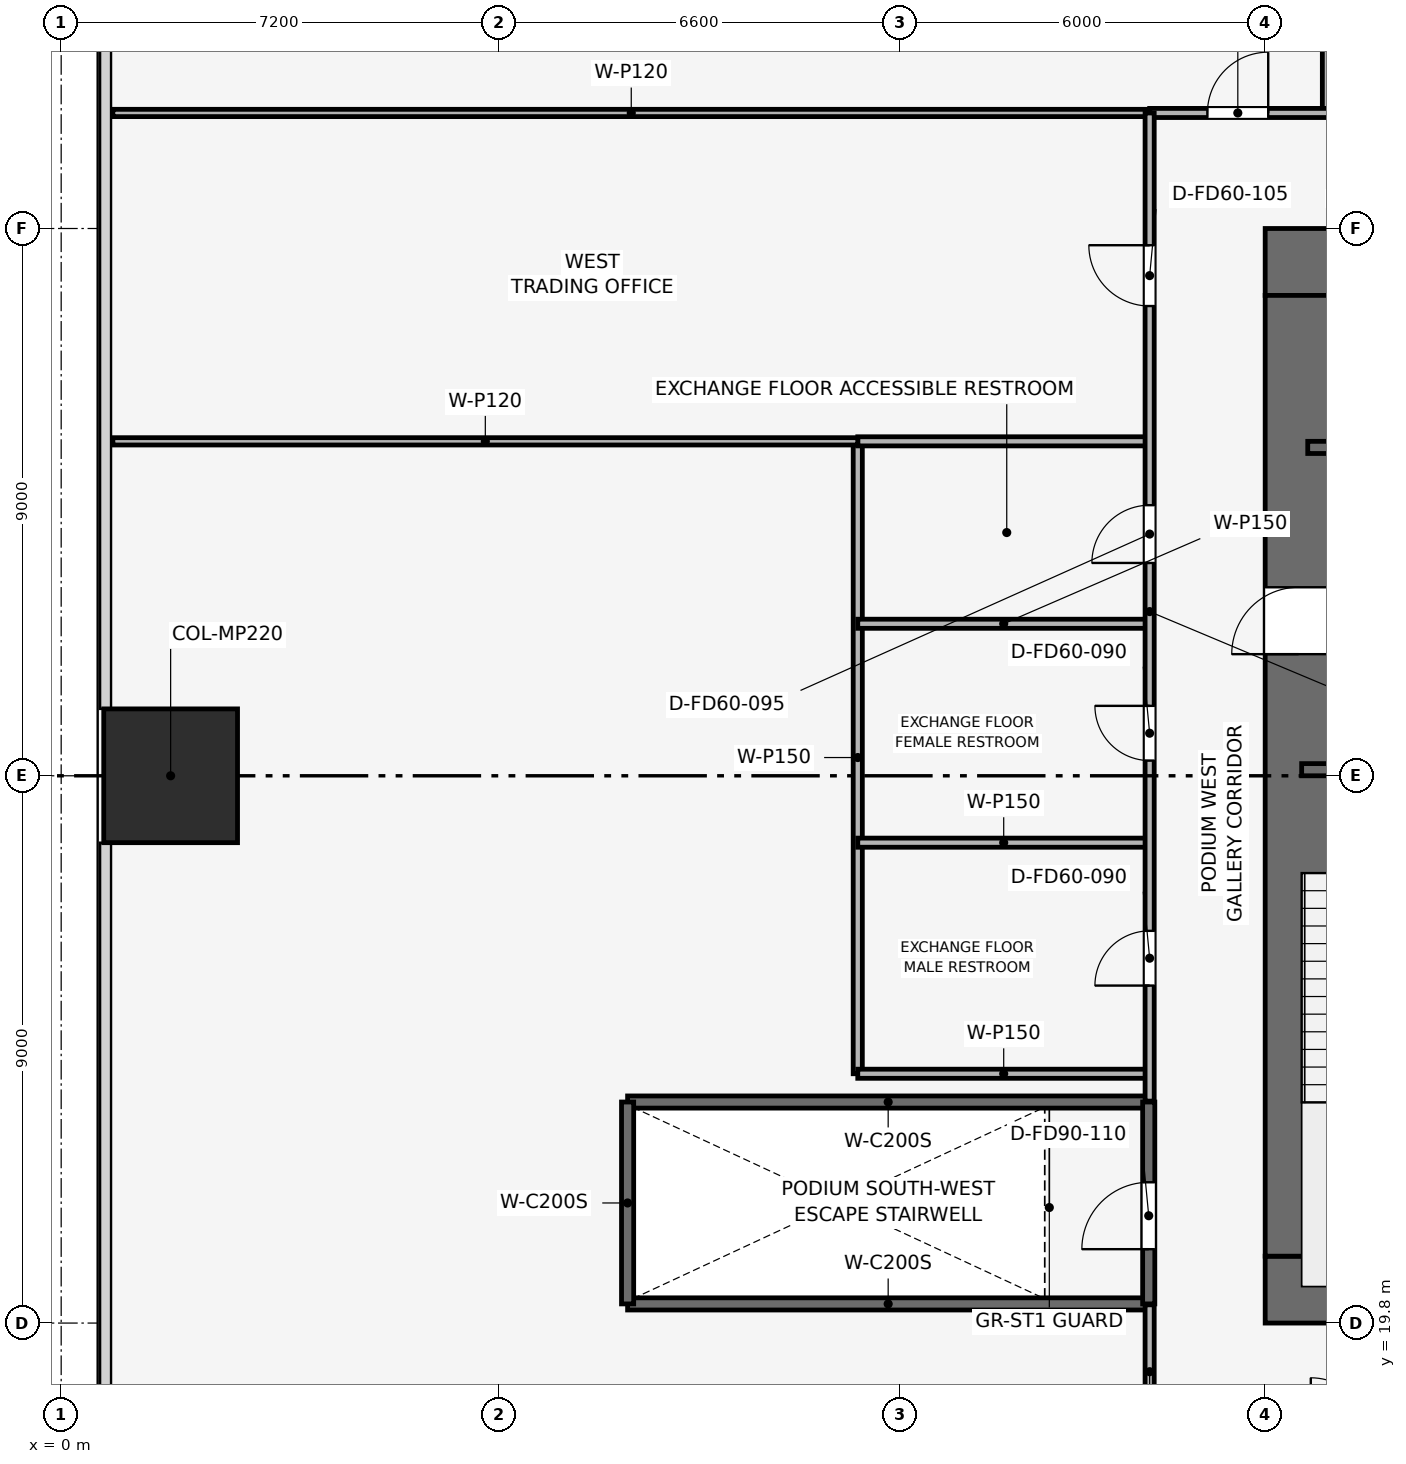
"""IFC4 building model, lengths in metres.
Left out: names, types, materials, properties, quantities, classifications, styles, units other than length and angle.
Written with IfcOpenShell. Run it as: python <this file> out.ifc"""

import sys

from ifc_helpers import new_model, si_unit, direction, frame, frame_2d, origin, origin_2d, place, context, subcontext, project, spatial, rectangle, extrude, element, fill, save


model = new_model("IFC4")
c1 = context("Model", 3, precision=1e-05, world=origin(), true_north=direction((0.0, 1.0)))
c2 = subcontext(c1, "Body", "Model", "MODEL_VIEW")
j1 = project(units=[si_unit("LENGTHUNIT", "METRE"), si_unit("PLANEANGLEUNIT", "RADIAN")], contexts=[c1])
p1 = place(None, origin())
s1 = spatial("IfcSite", under=j1, at=p1, CompositionType="ELEMENT")
p2 = place(p1, origin())
s2 = spatial("IfcBuilding", under=s1, at=p2, CompositionType="ELEMENT")
p3 = place(p2, frame((0.0, 0.0, 19.2)))
s3 = spatial("IfcBuildingStorey", under=s2, at=p3, CompositionType="ELEMENT", Elevation=19.2)
p4 = place(p3, frame((19.8, 20.35, 0.0), z_axis=(0.0, 0.0, 1.0), x_axis=(1.0, 0.0, 0.0)))
e1 = element("IfcWall", 1, at=p4, inside=s3, PredefinedType="SHEAR", context=c2, shape_type="SweptSolid", body=[
    extrude(rectangle(XDim=18.0, YDim=1.1, at=frame_2d((9.0, 0.0))), origin(), (0.0, 0.0, 1.0), 4.8),
])
p5 = place(p4, frame((8.4, 0.0, 0.0)))
e2 = element("IfcOpeningElement", 2, at=p5, cuts=e1, PredefinedType="OPENING", context=c2, shape_type="SweptSolid", body=[
    extrude(rectangle(XDim=1.2, YDim=2.2, at=frame_2d((0.6, 1.1))), frame((0.0, 0.56, 0.0), z_axis=(0.0, -1.0, 0.0), x_axis=(1.0, 0.0, 0.0)), (0.0, 0.0, 1.0), 1.12),
])
p6 = place(p3, frame((19.8, 37.25, 0.0), z_axis=(0.0, 0.0, 1.0), x_axis=(1.0, 0.0, 0.0)))
e3 = element("IfcWall", 3, at=p6, inside=s3, PredefinedType="SHEAR", context=c2, shape_type="SweptSolid", body=[
    extrude(rectangle(XDim=18.0, YDim=1.1, at=frame_2d((9.0, 0.0))), origin(), (0.0, 0.0, 1.0), 4.8),
])
p7 = place(p6, frame((7.05, 0.0, 0.0)))
e4 = element("IfcOpeningElement", 4, at=p7, cuts=e3, PredefinedType="OPENING", context=c2, shape_type="SweptSolid", body=[
    extrude(rectangle(XDim=1.1, YDim=2.15, at=frame_2d((0.55, 1.075))), frame((0.0, 0.56, 0.0), z_axis=(0.0, -1.0, 0.0), x_axis=(1.0, 0.0, 0.0)), (0.0, 0.0, 1.0), 1.12),
])
p8 = place(p3, frame((20.35, 20.9, 0.0), z_axis=(0.0, 0.0, 1.0), x_axis=(0.0, 1.0, 0.0)))
e5 = element("IfcWall", 5, at=p8, inside=s3, PredefinedType="SHEAR", context=c2, shape_type="SweptSolid", body=[
    extrude(rectangle(XDim=15.8, YDim=1.1, at=frame_2d((7.9, 0.0))), origin(), (0.0, 0.0, 1.0), 4.8),
])
p9 = place(p8, frame((9.9, 0.0, 0.0)))
e6 = element("IfcOpeningElement", 6, at=p9, cuts=e5, PredefinedType="OPENING", context=c2, shape_type="SweptSolid", body=[
    extrude(rectangle(XDim=1.1, YDim=2.15, at=frame_2d((0.55, 1.075))), frame((0.0, 0.56, 0.0), z_axis=(0.0, -1.0, 0.0), x_axis=(1.0, 0.0, 0.0)), (0.0, 0.0, 1.0), 1.12),
])
p10 = place(p3, frame((1.8, 28.8, 0.002), z_axis=(0.0, 0.0, 1.0), x_axis=(1.0, 0.0, 0.0)))
e7 = element("IfcColumn", 7, at=p10, inside=s3, PredefinedType="PILASTER", context=c2, shape_type="SweptSolid", body=[
    extrude(rectangle(XDim=2.2, YDim=2.2, at=origin_2d()), origin(), (0.0, 0.0, 1.0), 4.344),
])
p11 = place(p3, frame((20.4, 28.9, 0.0), z_axis=(0.0, 0.0, 1.0), x_axis=(1.0, 0.0, 0.0)))
e8 = element("IfcWall", 8, at=p11, inside=s3, PredefinedType="SHEAR", context=c2, shape_type="SweptSolid", body=[
    extrude(rectangle(XDim=3.15, YDim=0.2, at=frame_2d((1.575, 0.0))), origin(), (0.0, 0.0, 1.0), 4.35),
])
p12 = place(p11, frame((0.8, 0.0, 0.0)))
e9 = element("IfcOpeningElement", 9, at=p12, cuts=e8, PredefinedType="OPENING", context=c2, shape_type="SweptSolid", body=[
    extrude(rectangle(XDim=1.0, YDim=2.1, at=frame_2d((0.5, 1.05))), frame((0.0, 0.11, 0.0), z_axis=(0.0, -1.0, 0.0), x_axis=(1.0, 0.0, 0.0)), (0.0, 0.0, 1.0), 0.22),
])
p13 = place(p3, frame((20.5, 34.2, 0.0), z_axis=(0.0, 0.0, 1.0), x_axis=(1.0, 0.0, 0.0)))
e10 = element("IfcWall", 10, at=p13, inside=s3, PredefinedType="SHEAR", context=c2, shape_type="SweptSolid", body=[
    extrude(rectangle(XDim=3.05, YDim=0.2, at=frame_2d((1.525, 0.0))), origin(), (0.0, 0.0, 1.0), 4.35),
])
p14 = place(p13, frame((0.75, 0.0, 0.0)))
e11 = element("IfcOpeningElement", 11, at=p14, cuts=e10, PredefinedType="OPENING", context=c2, shape_type="SweptSolid", body=[
    extrude(rectangle(XDim=1.1, YDim=2.15, at=frame_2d((0.55, 1.075))), frame((0.0, 0.11, 0.0), z_axis=(0.0, -1.0, 0.0), x_axis=(1.0, 0.0, 0.0)), (0.0, 0.0, 1.0), 0.22),
])
for number, where, z_axis, x_axis in (
    (12, (9.315, 20.115, 0.0), (0.0, 0.0, 1.0), (1.0, 0.0, 0.0)),
    (13, (9.315, 23.435, 0.0), (0.0, 0.0, 1.0), (1.0, 0.0, 0.0)),
):
    element("IfcWall", number, at=place(p3, frame(where, z_axis=z_axis, x_axis=x_axis)), inside=s3, PredefinedType="SHEAR", context=c2, shape_type="SweptSolid", body=[
        extrude(rectangle(XDim=8.57, YDim=0.2, at=frame_2d((4.285, 0.0))), origin(), (0.0, 0.0, 1.0), 4.35),
    ])
p15 = place(p3, frame((9.315, 20.115, 0.0), z_axis=(0.0, 0.0, 1.0), x_axis=(0.0, 1.0, 0.0)))
e14 = element("IfcWall", 14, at=p15, inside=s3, PredefinedType="SHEAR", context=c2, shape_type="SweptSolid", body=[
    extrude(rectangle(XDim=3.32, YDim=0.2, at=frame_2d((1.66, 0.0))), origin(), (0.0, 0.0, 1.0), 4.35),
])
p16 = place(p3, frame((17.885, 20.115, 0.0), z_axis=(0.0, 0.0, 1.0), x_axis=(0.0, 1.0, 0.0)))
e15 = element("IfcWall", 15, at=p16, inside=s3, PredefinedType="SHEAR", context=c2, shape_type="SweptSolid", body=[
    extrude(rectangle(XDim=3.32, YDim=0.2, at=frame_2d((1.66, 0.0))), origin(), (0.0, 0.0, 1.0), 4.35),
])
p17 = place(p16, frame((0.9, 0.0, 0.0)))
e16 = element("IfcOpeningElement", 16, at=p17, cuts=e15, PredefinedType="OPENING", context=c2, shape_type="SweptSolid", body=[
    extrude(rectangle(XDim=1.1, YDim=2.15, at=frame_2d((0.55, 1.075))), frame((0.0, 0.11, 0.0), z_axis=(0.0, -1.0, 0.0), x_axis=(1.0, 0.0, 0.0)), (0.0, 0.0, 1.0), 0.22),
])
p18 = place(p3, frame((13.1, 23.9, 0.0), z_axis=(0.0, 0.0, 1.0), x_axis=(0.0, 1.0, 0.0)))
e17 = element("IfcWall", 17, at=p18, inside=s3, PredefinedType="PARTITIONING", context=c2, shape_type="SweptSolid", body=[
    extrude(rectangle(XDim=10.4, YDim=0.15, at=frame_2d((5.2, 0.0))), origin(), (0.0, 0.0, 1.0), 3.435),
])
for number, where, z_axis, x_axis in (
    (18, (13.1, 23.9, 0.0), (0.0, 0.0, 1.0), (1.0, 0.0, 0.0)),
    (19, (13.1, 34.3, 0.0), (0.0, 0.0, 1.0), (1.0, 0.0, 0.0)),
    (20, (13.1, 27.7, 0.0), (0.0, 0.0, 1.0), (1.0, 0.0, 0.0)),
    (21, (13.1, 31.3, 0.0), (0.0, 0.0, 1.0), (1.0, 0.0, 0.0)),
):
    element("IfcWall", number, at=place(p3, frame(where, z_axis=z_axis, x_axis=x_axis)), inside=s3, PredefinedType="PARTITIONING", context=c2, shape_type="SweptSolid", body=[
        extrude(rectangle(XDim=4.8, YDim=0.15, at=frame_2d((2.4, 0.0))), origin(), (0.0, 0.0, 1.0), 4.35),
    ])
p19 = place(p3, frame((20.8, 39.7, 0.0), z_axis=(0.0, 0.0, 1.0), x_axis=(0.0, 1.0, 0.0)))
e22 = element("IfcWall", 22, at=p19, inside=s3, PredefinedType="PARTITIONING", context=c2, shape_type="SweptSolid", body=[
    extrude(rectangle(XDim=17.05, YDim=0.12, at=frame_2d((8.525, 0.0))), origin(), (0.0, 0.0, 1.0), 3.335),
])
p20 = place(p3, frame((0.85, 34.3, 0.0), z_axis=(0.0, 0.0, 1.0), x_axis=(1.0, 0.0, 0.0)))
e23 = element("IfcWall", 23, at=p20, inside=s3, PredefinedType="PARTITIONING", context=c2, shape_type="SweptSolid", body=[
    extrude(rectangle(XDim=12.25, YDim=0.12, at=frame_2d((6.125, 0.0))), origin(), (0.0, 0.0, 1.0), 3.335),
])
p21 = place(p3, frame((0.85, 39.7, 0.0), z_axis=(0.0, 0.0, 1.0), x_axis=(1.0, 0.0, 0.0)))
e24 = element("IfcWall", 24, at=p21, inside=s3, PredefinedType="PARTITIONING", context=c2, shape_type="SweptSolid", body=[
    extrude(rectangle(XDim=17.05, YDim=0.12, at=frame_2d((8.525, 0.0))), origin(), (0.0, 0.0, 1.0), 3.335),
])
p22 = place(p3, frame((17.9, 39.7, 0.0), z_axis=(0.0, 0.0, 1.0), x_axis=(1.0, 0.0, 0.0)))
e25 = element("IfcWall", 25, at=p22, inside=s3, PredefinedType="PARTITIONING", context=c2, shape_type="SweptSolid", body=[
    extrude(rectangle(XDim=21.8, YDim=0.15, at=frame_2d((10.9, 0.0))), origin(), (0.0, 0.0, 1.0), 3.435),
])
p23 = place(p22, frame((0.95, 0.0, 0.0)))
e26 = element("IfcOpeningElement", 26, at=p23, cuts=e25, PredefinedType="OPENING", context=c2, shape_type="SweptSolid", body=[
    extrude(rectangle(XDim=1.0, YDim=2.15, at=frame_2d((0.5, 1.075))), frame((0.0, 0.085, 0.0), z_axis=(0.0, -1.0, 0.0), x_axis=(1.0, 0.0, 0.0)), (0.0, 0.0, 1.0), 0.17),
])
p24 = place(p22, frame((6.4, 0.0, 0.0)))
e27 = element("IfcOpeningElement", 27, at=p24, cuts=e25, PredefinedType="OPENING", context=c2, shape_type="SweptSolid", body=[
    extrude(rectangle(XDim=1.0, YDim=2.15, at=frame_2d((0.5, 1.075))), frame((0.0, 0.085, 0.0), z_axis=(0.0, -1.0, 0.0), x_axis=(1.0, 0.0, 0.0)), (0.0, 0.0, 1.0), 0.17),
])
p25 = place(p22, frame((14.4, 0.0, 0.0)))
e28 = element("IfcOpeningElement", 28, at=p25, cuts=e25, PredefinedType="OPENING", context=c2, shape_type="SweptSolid", body=[
    extrude(rectangle(XDim=1.0, YDim=2.15, at=frame_2d((0.5, 1.075))), frame((0.0, 0.085, 0.0), z_axis=(0.0, -1.0, 0.0), x_axis=(1.0, 0.0, 0.0)), (0.0, 0.0, 1.0), 0.17),
])
p26 = place(p22, frame((19.85, 0.0, 0.0)))
e29 = element("IfcOpeningElement", 29, at=p26, cuts=e25, PredefinedType="OPENING", context=c2, shape_type="SweptSolid", body=[
    extrude(rectangle(XDim=1.0, YDim=2.15, at=frame_2d((0.5, 1.075))), frame((0.0, 0.085, 0.0), z_axis=(0.0, -1.0, 0.0), x_axis=(1.0, 0.0, 0.0)), (0.0, 0.0, 1.0), 0.17),
])
p27 = place(p3, frame((17.9, 17.9, 0.0), z_axis=(0.0, 0.0, 1.0), x_axis=(0.0, 1.0, 0.0)))
e30 = element("IfcWall", 30, at=p27, inside=s3, PredefinedType="PARTITIONING", context=c2, shape_type="SweptSolid", body=[
    extrude(rectangle(XDim=2.2, YDim=0.15, at=frame_2d((1.1, 0.0))), origin(), (0.0, 0.0, 1.0), 4.35),
])
p28 = place(p3, frame((17.9, 23.45, 0.0), z_axis=(0.0, 0.0, 1.0), x_axis=(0.0, 1.0, 0.0)))
e31 = element("IfcWall", 31, at=p28, inside=s3, PredefinedType="PARTITIONING", context=c2, shape_type="SweptSolid", body=[
    extrude(rectangle(XDim=16.25, YDim=0.15, at=frame_2d((8.125, 0.0))), origin(), (0.0, 0.0, 1.0), 3.435),
])
p29 = place(p28, frame((1.9, 0.0, 0.0)))
e32 = element("IfcOpeningElement", 32, at=p29, cuts=e31, PredefinedType="OPENING", context=c2, shape_type="SweptSolid", body=[
    extrude(rectangle(XDim=0.9, YDim=2.1, at=frame_2d((0.45, 1.05))), frame((0.0, 0.085, 0.0), z_axis=(0.0, -1.0, 0.0), x_axis=(1.0, 0.0, 0.0)), (0.0, 0.0, 1.0), 0.17),
])
p30 = place(p28, frame((5.6, 0.0, 0.0)))
e33 = element("IfcOpeningElement", 33, at=p30, cuts=e31, PredefinedType="OPENING", context=c2, shape_type="SweptSolid", body=[
    extrude(rectangle(XDim=0.9, YDim=2.1, at=frame_2d((0.45, 1.05))), frame((0.0, 0.085, 0.0), z_axis=(0.0, -1.0, 0.0), x_axis=(1.0, 0.0, 0.0)), (0.0, 0.0, 1.0), 0.17),
])
p31 = place(p28, frame((8.85, 0.0, 0.0)))
e34 = element("IfcOpeningElement", 34, at=p31, cuts=e31, PredefinedType="OPENING", context=c2, shape_type="SweptSolid", body=[
    extrude(rectangle(XDim=0.95, YDim=2.1, at=frame_2d((0.475, 1.05))), frame((0.0, 0.085, 0.0), z_axis=(0.0, -1.0, 0.0), x_axis=(1.0, 0.0, 0.0)), (0.0, 0.0, 1.0), 0.17),
])
p32 = place(p28, frame((13.075, 0.0, 0.0)))
e35 = element("IfcOpeningElement", 35, at=p32, cuts=e31, PredefinedType="OPENING", context=c2, shape_type="SweptSolid", body=[
    extrude(rectangle(XDim=1.0, YDim=2.15, at=frame_2d((0.5, 1.075))), frame((0.0, 0.085, 0.0), z_axis=(0.0, -1.0, 0.0), x_axis=(1.0, 0.0, 0.0)), (0.0, 0.0, 1.0), 0.17),
])
p33 = place(p17, origin())
e36 = element("IfcDoor", 36, at=p33, inside=s3, OperationType="SINGLE_SWING_LEFT", PredefinedType="DOOR", context=c2, shape_type="SweptSolid", body=[
    extrude(rectangle(XDim=1.1, YDim=2.15, at=frame_2d((0.55, 1.075))), frame((0.0, 0.025, 0.0), z_axis=(0.0, -1.0, 0.0), x_axis=(1.0, 0.0, 0.0)), (0.0, 0.0, 1.0), 0.05),
])
fill(e16, e36)
p34 = place(p23, origin())
e37 = element("IfcDoor", 37, at=p34, inside=s3, OperationType="SINGLE_SWING_RIGHT", PredefinedType="DOOR", context=c2, shape_type="SweptSolid", body=[
    extrude(rectangle(XDim=1.0, YDim=2.15, at=frame_2d((0.5, 1.075))), frame((0.0, 0.025, 0.0), z_axis=(0.0, -1.0, 0.0), x_axis=(1.0, 0.0, 0.0)), (0.0, 0.0, 1.0), 0.05),
])
fill(e26, e37)
p35 = place(p29, origin())
e38 = element("IfcDoor", 38, at=p35, inside=s3, OperationType="SINGLE_SWING_LEFT", PredefinedType="DOOR", context=c2, shape_type="SweptSolid", body=[
    extrude(rectangle(XDim=0.9, YDim=2.1, at=frame_2d((0.45, 1.05))), frame((0.0, 0.025, 0.0), z_axis=(0.0, -1.0, 0.0), x_axis=(1.0, 0.0, 0.0)), (0.0, 0.0, 1.0), 0.05),
])
fill(e32, e38)
p36 = place(p30, origin())
e39 = element("IfcDoor", 39, at=p36, inside=s3, OperationType="SINGLE_SWING_RIGHT", PredefinedType="DOOR", context=c2, shape_type="SweptSolid", body=[
    extrude(rectangle(XDim=0.9, YDim=2.1, at=frame_2d((0.45, 1.05))), frame((0.0, 0.025, 0.0), z_axis=(0.0, -1.0, 0.0), x_axis=(1.0, 0.0, 0.0)), (0.0, 0.0, 1.0), 0.05),
])
fill(e33, e39)
p37 = place(p31, origin())
e40 = element("IfcDoor", 40, at=p37, inside=s3, OperationType="SINGLE_SWING_LEFT", PredefinedType="DOOR", context=c2, shape_type="SweptSolid", body=[
    extrude(rectangle(XDim=0.95, YDim=2.1, at=frame_2d((0.475, 1.05))), frame((0.0, 0.025, 0.0), z_axis=(0.0, -1.0, 0.0), x_axis=(1.0, 0.0, 0.0)), (0.0, 0.0, 1.0), 0.05),
])
fill(e34, e40)
p38 = place(p32, origin())
e41 = element("IfcDoor", 41, at=p38, inside=s3, OperationType="SINGLE_SWING_RIGHT", PredefinedType="DOOR", context=c2, shape_type="SweptSolid", body=[
    extrude(rectangle(XDim=1.0, YDim=2.15, at=frame_2d((0.5, 1.075))), frame((0.0, 0.025, 0.0), z_axis=(0.0, -1.0, 0.0), x_axis=(1.0, 0.0, 0.0)), (0.0, 0.0, 1.0), 0.05),
])
fill(e35, e41)
p39 = place(p9, origin())
e42 = element("IfcDoor", 42, at=p39, inside=s3, OperationType="SINGLE_SWING_LEFT", PredefinedType="DOOR", context=c2, shape_type="SweptSolid", body=[
    extrude(rectangle(XDim=1.1, YDim=2.15, at=frame_2d((0.55, 1.075))), frame((0.0, 0.025, 0.0), z_axis=(0.0, -1.0, 0.0), x_axis=(1.0, 0.0, 0.0)), (0.0, 0.0, 1.0), 0.05),
])
fill(e6, e42)
save(model, sys.argv[1])
